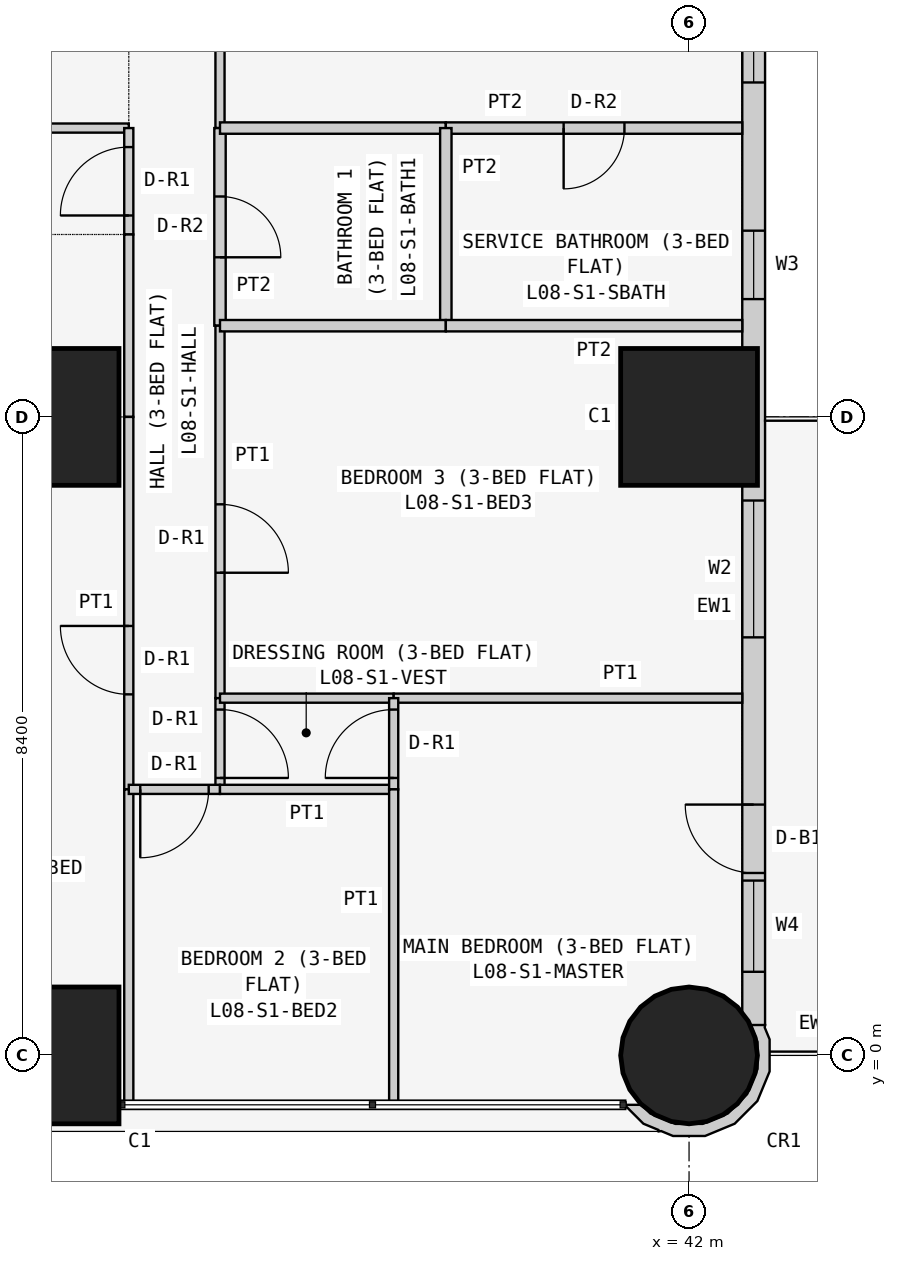
"""IFC4 building model, lengths in metres.
Left out: names, types, materials, properties, quantities, classifications, styles, units other than length and angle.
Written with IfcOpenShell. Run it as: python <this file> out.ifc"""

import sys

from ifc_helpers import new_model, si_unit, direction, frame, frame_2d, origin, origin_2d, place, context, subcontext, project, spatial, polyline, rectangle, circle, outline, extrude, element, fill, save


model = new_model("IFC4")
c1 = context("Model", 3, precision=1e-05, world=origin(), true_north=direction((0.0, 1.0)))
c2 = subcontext(c1, "Body", "Model", "MODEL_VIEW")
j1 = project(units=[si_unit("LENGTHUNIT", "METRE"), si_unit("PLANEANGLEUNIT", "RADIAN")], contexts=[c1])
p1 = place(None, origin())
s1 = spatial("IfcSite", under=j1, at=p1, CompositionType="ELEMENT")
p2 = place(p1, origin())
s2 = spatial("IfcBuilding", under=s1, at=p2, CompositionType="ELEMENT")
p3 = place(p2, frame((0.0, 0.0, 38.1)))
s3 = spatial("IfcBuildingStorey", under=s2, at=p3, CompositionType="ELEMENT", Elevation=38.1)
for number, where, z_axis, x_axis in (
    (1, (33.6, 0.0, 0.0), (0.0, 0.0, 1.0), (1.0, 0.0, 0.0)),
    (2, (33.6, 8.4, 0.0), (0.0, 0.0, 1.0), (1.0, 0.0, 0.0)),
):
    element("IfcColumn", number, at=place(p3, frame(where, z_axis=z_axis, x_axis=x_axis)), inside=s3, PredefinedType="COLUMN", context=c2, shape_type="SweptSolid", body=[
        extrude(rectangle(XDim=1.8, YDim=1.8, at=origin_2d()), origin(), (0.0, 0.0, 1.0), 3.6),
    ])
p4 = place(p3, frame((42.0, 0.0, 0.0), z_axis=(0.0, 0.0, 1.0), x_axis=(1.0, 0.0, 0.0)))
e3 = element("IfcColumn", 3, at=p4, inside=s3, PredefinedType="COLUMN", context=c2, shape_type="SweptSolid", body=[
    extrude(circle(Radius=0.9, at=origin_2d()), origin(), (0.0, 0.0, 1.0), 3.6),
])
p5 = place(p3, frame((42.0, 8.4, 0.0), z_axis=(0.0, 0.0, 1.0), x_axis=(1.0, 0.0, 0.0)))
e4 = element("IfcColumn", 4, at=p5, inside=s3, PredefinedType="COLUMN", context=c2, shape_type="SweptSolid", body=[
    extrude(rectangle(XDim=1.8, YDim=1.8, at=origin_2d()), origin(), (0.0, 0.0, 1.0), 3.6),
])
p6 = place(p3, frame((42.85, 0.4, 0.0), z_axis=(0.0, 0.0, 1.0), x_axis=(0.0, 1.0, 0.0)))
e5 = element("IfcWall", 5, at=p6, inside=s3, PredefinedType="SOLIDWALL", context=c2, shape_type="SweptSolid", body=[
    extrude(rectangle(XDim=15.7, YDim=0.3, at=frame_2d((7.85, 0.0))), origin(), (0.0, 0.0, 1.0), 3.45),
])
p7 = place(p6, frame((12.4, 0.0, 0.9)))
e6 = element("IfcOpeningElement", 6, at=p7, cuts=e5, PredefinedType="OPENING", context=c2, shape_type="SweptSolid", body=[
    extrude(rectangle(XDim=1.8, YDim=1.5, at=frame_2d((0.9, 0.75))), frame((0.0, 0.16, 0.0), z_axis=(0.0, -1.0, 0.0), x_axis=(1.0, 0.0, 0.0)), (0.0, 0.0, 1.0), 0.32),
])
p8 = place(p6, frame((9.55, 0.0, 1.5)))
e7 = element("IfcOpeningElement", 7, at=p8, cuts=e5, PredefinedType="OPENING", context=c2, shape_type="SweptSolid", body=[
    extrude(rectangle(XDim=0.9, YDim=0.7, at=frame_2d((0.45, 0.35))), frame((0.0, 0.16, 0.0), z_axis=(0.0, -1.0, 0.0), x_axis=(1.0, 0.0, 0.0)), (0.0, 0.0, 1.0), 0.32),
])
p9 = place(p6, frame((5.1, 0.0, 0.9)))
e8 = element("IfcOpeningElement", 8, at=p9, cuts=e5, PredefinedType="OPENING", context=c2, shape_type="SweptSolid", body=[
    extrude(rectangle(XDim=1.8, YDim=1.5, at=frame_2d((0.9, 0.75))), frame((0.0, 0.16, 0.0), z_axis=(0.0, -1.0, 0.0), x_axis=(1.0, 0.0, 0.0)), (0.0, 0.0, 1.0), 0.32),
])
p10 = place(p6, frame((2.0, 0.0, 0.0)))
e9 = element("IfcOpeningElement", 9, at=p10, cuts=e5, PredefinedType="OPENING", context=c2, shape_type="SweptSolid", body=[
    extrude(rectangle(XDim=0.9, YDim=2.4, at=frame_2d((0.45, 1.2))), frame((0.0, 0.16, 0.0), z_axis=(0.0, -1.0, 0.0), x_axis=(1.0, 0.0, 0.0)), (0.0, 0.0, 1.0), 0.32),
])
p11 = place(p6, frame((0.7, 0.0, 0.9)))
e10 = element("IfcOpeningElement", 10, at=p11, cuts=e5, PredefinedType="OPENING", context=c2, shape_type="SweptSolid", body=[
    extrude(rectangle(XDim=1.2, YDim=1.5, at=frame_2d((0.6, 0.75))), frame((0.0, 0.16, 0.0), z_axis=(0.0, -1.0, 0.0), x_axis=(1.0, 0.0, 0.0)), (0.0, 0.0, 1.0), 0.32),
])
p12 = place(p3, frame((41.233, -0.611, 0.0), z_axis=(0.0, 0.0, 1.0), x_axis=(0.377204953059, -0.926129809145, 0.0)))
e11 = element("IfcWall", 11, at=p12, inside=s3, PredefinedType="SOLIDWALL", context=c2, shape_type="SweptSolid", body=[
    extrude(outline(polyline([(0.319, 1.843), (-0.072, 2.001), (-0.24, 2.001), (-0.269, 2.017), (-0.37, 1.841), (-0.102, 1.842), (0.23, 1.707), (0.485, 1.455), (0.624, 1.125), (0.626, 0.766), (0.49, 0.434), (0.239, 0.179), (0.09, 0.117), (0.011, -0.078), (0.024, -0.083), (0.33, 0.045), (0.48, 0.197), (0.499, 0.193), (0.508, 0.225), (0.626, 0.345), (0.785, 0.736), (0.782, 1.157), (0.619, 1.546), (0.319, 1.843)])), origin(), (0.0, 0.0, 1.0), 3.45),
])
p13 = place(p3, frame((29.4, 12.2, 0.0), z_axis=(0.0, 0.0, 1.0), x_axis=(1.0, 0.0, 0.0)))
e12 = element("IfcWall", 12, at=p13, inside=s3, PredefinedType="PARTITIONING", context=c2, shape_type="SweptSolid", body=[
    extrude(rectangle(XDim=5.229, YDim=0.12, at=frame_2d((2.615, 0.0))), origin(), (0.0, 0.0, 1.0), 3.45),
])
p14 = place(p3, frame((34.629, 10.8, 0.0), z_axis=(0.0, 0.0, 1.0), x_axis=(0.0, 1.0, 0.0)))
e13 = element("IfcWall", 13, at=p14, inside=s3, PredefinedType="PARTITIONING", context=c2, shape_type="SweptSolid", body=[
    extrude(rectangle(XDim=1.4, YDim=0.12, at=frame_2d((0.7, 0.0))), origin(), (0.0, 0.0, 1.0), 3.45),
])
p15 = place(p14, frame((0.25, 0.0, 0.0)))
e14 = element("IfcOpeningElement", 14, at=p15, cuts=e13, PredefinedType="OPENING", context=c2, shape_type="SweptSolid", body=[
    extrude(rectangle(XDim=0.9, YDim=2.1, at=frame_2d((0.45, 1.05))), frame((0.0, 0.07, 0.0), z_axis=(0.0, -1.0, 0.0), x_axis=(1.0, 0.0, 0.0)), (0.0, 0.0, 1.0), 0.14),
])
p16 = place(p3, frame((34.629, 8.4, 0.0), z_axis=(0.0, 0.0, 1.0), x_axis=(0.0, 1.0, 0.0)))
e15 = element("IfcWall", 15, at=p16, inside=s3, PredefinedType="PARTITIONING", context=c2, shape_type="SweptSolid", body=[
    extrude(rectangle(XDim=2.4, YDim=0.12, at=frame_2d((1.2, 0.0))), origin(), (0.0, 0.0, 1.0), 3.45),
])
p17 = place(p3, frame((34.629, 3.5, 0.0), z_axis=(0.0, 0.0, 1.0), x_axis=(0.0, 1.0, 0.0)))
e16 = element("IfcWall", 16, at=p17, inside=s3, PredefinedType="PARTITIONING", context=c2, shape_type="SweptSolid", body=[
    extrude(rectangle(XDim=4.9, YDim=0.12, at=frame_2d((2.45, 0.0))), origin(), (0.0, 0.0, 1.0), 3.45),
])
p18 = place(p17, frame((1.25, 0.0, 0.0)))
e17 = element("IfcOpeningElement", 17, at=p18, cuts=e16, PredefinedType="OPENING", context=c2, shape_type="SweptSolid", body=[
    extrude(rectangle(XDim=0.9, YDim=2.1, at=frame_2d((0.45, 1.05))), frame((0.0, 0.07, 0.0), z_axis=(0.0, -1.0, 0.0), x_axis=(1.0, 0.0, 0.0)), (0.0, 0.0, 1.0), 0.14),
])
p19 = place(p3, frame((34.629, -0.65, 0.0), z_axis=(0.0, 0.0, 1.0), x_axis=(0.0, 1.0, 0.0)))
e18 = element("IfcWall", 18, at=p19, inside=s3, PredefinedType="PARTITIONING", context=c2, shape_type="SweptSolid", body=[
    extrude(rectangle(XDim=4.15, YDim=0.12, at=frame_2d((2.075, 0.0))), origin(), (0.0, 0.0, 1.0), 3.45),
])
p20 = place(p3, frame((35.829, 12.2, 0.0), z_axis=(0.0, 0.0, 1.0), x_axis=(0.0, 1.0, 0.0)))
e19 = element("IfcWall", 19, at=p20, inside=s3, PredefinedType="PARTITIONING", context=c2, shape_type="SweptSolid", body=[
    extrude(rectangle(XDim=3.575, YDim=0.12, at=frame_2d((1.788, 0.0))), origin(), (0.0, 0.0, 1.0), 3.45),
])
p21 = place(p20, frame((1.35, 0.0, 0.0)))
e20 = element("IfcOpeningElement", 20, at=p21, cuts=e19, PredefinedType="OPENING", context=c2, shape_type="SweptSolid", body=[
    extrude(rectangle(XDim=0.9, YDim=2.1, at=frame_2d((0.45, 1.05))), frame((0.0, 0.07, 0.0), z_axis=(0.0, -1.0, 0.0), x_axis=(1.0, 0.0, 0.0)), (0.0, 0.0, 1.0), 0.14),
])
p22 = place(p3, frame((35.829, 9.6, 0.0), z_axis=(0.0, 0.0, 1.0), x_axis=(0.0, 1.0, 0.0)))
e21 = element("IfcWall", 21, at=p22, inside=s3, PredefinedType="PARTITIONING", context=c2, shape_type="SweptSolid", body=[
    extrude(rectangle(XDim=2.6, YDim=0.15, at=frame_2d((1.3, 0.0))), origin(), (0.0, 0.0, 1.0), 3.45),
])
p23 = place(p22, frame((0.9, 0.0, 0.0)))
e22 = element("IfcOpeningElement", 22, at=p23, cuts=e21, PredefinedType="OPENING", context=c2, shape_type="SweptSolid", body=[
    extrude(rectangle(XDim=0.8, YDim=2.1, at=frame_2d((0.4, 1.05))), frame((0.0, 0.085, 0.0), z_axis=(0.0, -1.0, 0.0), x_axis=(1.0, 0.0, 0.0)), (0.0, 0.0, 1.0), 0.17),
])
p24 = place(p3, frame((35.829, 4.7, 0.0), z_axis=(0.0, 0.0, 1.0), x_axis=(0.0, 1.0, 0.0)))
e23 = element("IfcWall", 23, at=p24, inside=s3, PredefinedType="PARTITIONING", context=c2, shape_type="SweptSolid", body=[
    extrude(rectangle(XDim=4.9, YDim=0.12, at=frame_2d((2.45, 0.0))), origin(), (0.0, 0.0, 1.0), 3.45),
])
p25 = place(p24, frame((1.65, 0.0, 0.0)))
e24 = element("IfcOpeningElement", 24, at=p25, cuts=e23, PredefinedType="OPENING", context=c2, shape_type="SweptSolid", body=[
    extrude(rectangle(XDim=0.9, YDim=2.1, at=frame_2d((0.45, 1.05))), frame((0.0, 0.07, 0.0), z_axis=(0.0, -1.0, 0.0), x_axis=(1.0, 0.0, 0.0)), (0.0, 0.0, 1.0), 0.14),
])
p26 = place(p3, frame((35.829, 3.5, 0.0), z_axis=(0.0, 0.0, 1.0), x_axis=(0.0, 1.0, 0.0)))
e25 = element("IfcWall", 25, at=p26, inside=s3, PredefinedType="PARTITIONING", context=c2, shape_type="SweptSolid", body=[
    extrude(rectangle(XDim=1.2, YDim=0.12, at=frame_2d((0.6, 0.0))), origin(), (0.0, 0.0, 1.0), 3.45),
])
p27 = place(p26, frame((0.15, 0.0, 0.0)))
e26 = element("IfcOpeningElement", 26, at=p27, cuts=e25, PredefinedType="OPENING", context=c2, shape_type="SweptSolid", body=[
    extrude(rectangle(XDim=0.9, YDim=2.1, at=frame_2d((0.45, 1.05))), frame((0.0, 0.07, 0.0), z_axis=(0.0, -1.0, 0.0), x_axis=(1.0, 0.0, 0.0)), (0.0, 0.0, 1.0), 0.14),
])
p28 = place(p3, frame((34.629, 3.5, 0.0), z_axis=(0.0, 0.0, 1.0), x_axis=(1.0, 0.0, 0.0)))
e27 = element("IfcWall", 27, at=p28, inside=s3, PredefinedType="PARTITIONING", context=c2, shape_type="SweptSolid", body=[
    extrude(rectangle(XDim=1.2, YDim=0.12, at=frame_2d((0.6, 0.0))), origin(), (0.0, 0.0, 1.0), 3.45),
])
p29 = place(p28, frame((0.151, 0.0, 0.0)))
e28 = element("IfcOpeningElement", 28, at=p29, cuts=e27, PredefinedType="OPENING", context=c2, shape_type="SweptSolid", body=[
    extrude(rectangle(XDim=0.9, YDim=2.1, at=frame_2d((0.45, 1.05))), frame((0.0, 0.07, 0.0), z_axis=(0.0, -1.0, 0.0), x_axis=(1.0, 0.0, 0.0)), (0.0, 0.0, 1.0), 0.14),
])
p30 = place(p3, frame((35.829, 12.2, 0.0), z_axis=(0.0, 0.0, 1.0), x_axis=(1.0, 0.0, 0.0)))
e29 = element("IfcWall", 29, at=p30, inside=s3, PredefinedType="PARTITIONING", context=c2, shape_type="SweptSolid", body=[
    extrude(rectangle(XDim=2.971, YDim=0.15, at=frame_2d((1.485, 0.0))), origin(), (0.0, 0.0, 1.0), 3.45),
])
p31 = place(p3, frame((38.8, 12.2, 0.0), z_axis=(0.0, 0.0, 1.0), x_axis=(1.0, 0.0, 0.0)))
e30 = element("IfcWall", 30, at=p31, inside=s3, PredefinedType="PARTITIONING", context=c2, shape_type="SweptSolid", body=[
    extrude(rectangle(XDim=3.9, YDim=0.15, at=frame_2d((1.95, 0.0))), origin(), (0.0, 0.0, 1.0), 3.45),
])
p32 = place(p31, frame((1.55, 0.0, 0.0)))
e31 = element("IfcOpeningElement", 31, at=p32, cuts=e30, PredefinedType="OPENING", context=c2, shape_type="SweptSolid", body=[
    extrude(rectangle(XDim=0.8, YDim=2.1, at=frame_2d((0.4, 1.05))), frame((0.0, 0.085, 0.0), z_axis=(0.0, -1.0, 0.0), x_axis=(1.0, 0.0, 0.0)), (0.0, 0.0, 1.0), 0.17),
])
p33 = place(p3, frame((38.8, 9.6, 0.0), z_axis=(0.0, 0.0, 1.0), x_axis=(0.0, 1.0, 0.0)))
e32 = element("IfcWall", 32, at=p33, inside=s3, PredefinedType="PARTITIONING", context=c2, shape_type="SweptSolid", body=[
    extrude(rectangle(XDim=2.6, YDim=0.15, at=frame_2d((1.3, 0.0))), origin(), (0.0, 0.0, 1.0), 3.45),
])
p34 = place(p3, frame((35.829, 9.6, 0.0), z_axis=(0.0, 0.0, 1.0), x_axis=(1.0, 0.0, 0.0)))
e33 = element("IfcWall", 33, at=p34, inside=s3, PredefinedType="PARTITIONING", context=c2, shape_type="SweptSolid", body=[
    extrude(rectangle(XDim=2.971, YDim=0.15, at=frame_2d((1.485, 0.0))), origin(), (0.0, 0.0, 1.0), 3.45),
])
p35 = place(p3, frame((38.8, 9.6, 0.0), z_axis=(0.0, 0.0, 1.0), x_axis=(1.0, 0.0, 0.0)))
e34 = element("IfcWall", 34, at=p35, inside=s3, PredefinedType="PARTITIONING", context=c2, shape_type="SweptSolid", body=[
    extrude(rectangle(XDim=3.9, YDim=0.15, at=frame_2d((1.95, 0.0))), origin(), (0.0, 0.0, 1.0), 3.45),
])
p36 = place(p3, frame((35.829, 4.7, 0.0), z_axis=(0.0, 0.0, 1.0), x_axis=(1.0, 0.0, 0.0)))
e35 = element("IfcWall", 35, at=p36, inside=s3, PredefinedType="PARTITIONING", context=c2, shape_type="SweptSolid", body=[
    extrude(rectangle(XDim=2.285, YDim=0.12, at=frame_2d((1.143, 0.0))), origin(), (0.0, 0.0, 1.0), 3.45),
])
p37 = place(p3, frame((38.114, 4.7, 0.0), z_axis=(0.0, 0.0, 1.0), x_axis=(1.0, 0.0, 0.0)))
e36 = element("IfcWall", 36, at=p37, inside=s3, PredefinedType="PARTITIONING", context=c2, shape_type="SweptSolid", body=[
    extrude(rectangle(XDim=4.586, YDim=0.12, at=frame_2d((2.293, 0.0))), origin(), (0.0, 0.0, 1.0), 3.45),
])
p38 = place(p3, frame((35.829, 3.5, 0.0), z_axis=(0.0, 0.0, 1.0), x_axis=(1.0, 0.0, 0.0)))
e37 = element("IfcWall", 37, at=p38, inside=s3, PredefinedType="PARTITIONING", context=c2, shape_type="SweptSolid", body=[
    extrude(rectangle(XDim=2.285, YDim=0.12, at=frame_2d((1.143, 0.0))), origin(), (0.0, 0.0, 1.0), 3.45),
])
p39 = place(p3, frame((38.114, 3.5, 0.0), z_axis=(0.0, 0.0, 1.0), x_axis=(0.0, 1.0, 0.0)))
e38 = element("IfcWall", 38, at=p39, inside=s3, PredefinedType="PARTITIONING", context=c2, shape_type="SweptSolid", body=[
    extrude(rectangle(XDim=1.2, YDim=0.12, at=frame_2d((0.6, 0.0))), origin(), (0.0, 0.0, 1.0), 3.45),
])
p40 = place(p39, frame((0.15, 0.0, 0.0)))
e39 = element("IfcOpeningElement", 39, at=p40, cuts=e38, PredefinedType="OPENING", context=c2, shape_type="SweptSolid", body=[
    extrude(rectangle(XDim=0.9, YDim=2.1, at=frame_2d((0.45, 1.05))), frame((0.0, 0.07, 0.0), z_axis=(0.0, -1.0, 0.0), x_axis=(1.0, 0.0, 0.0)), (0.0, 0.0, 1.0), 0.14),
])
p41 = place(p3, frame((38.114, -0.65, 0.0), z_axis=(0.0, 0.0, 1.0), x_axis=(0.0, 1.0, 0.0)))
e40 = element("IfcWall", 40, at=p41, inside=s3, PredefinedType="PARTITIONING", context=c2, shape_type="SweptSolid", body=[
    extrude(rectangle(XDim=4.15, YDim=0.12, at=frame_2d((2.075, 0.0))), origin(), (0.0, 0.0, 1.0), 3.45),
])
p42 = place(p7, origin())
e41 = element("IfcWindow", 41, at=p42, inside=s3, PartitioningType="SINGLE_PANEL", PredefinedType="WINDOW", context=c2, shape_type="SweptSolid", body=[
    extrude(rectangle(XDim=1.8, YDim=1.5, at=frame_2d((0.9, 0.75))), frame((0.0, 0.03, 0.0), z_axis=(0.0, -1.0, 0.0), x_axis=(1.0, 0.0, 0.0)), (0.0, 0.0, 1.0), 0.06),
])
fill(e6, e41)
p43 = place(p8, origin())
e42 = element("IfcWindow", 42, at=p43, inside=s3, PartitioningType="SINGLE_PANEL", PredefinedType="WINDOW", context=c2, shape_type="SweptSolid", body=[
    extrude(rectangle(XDim=0.9, YDim=0.7, at=frame_2d((0.45, 0.35))), frame((0.0, 0.03, 0.0), z_axis=(0.0, -1.0, 0.0), x_axis=(1.0, 0.0, 0.0)), (0.0, 0.0, 1.0), 0.06),
])
fill(e7, e42)
p44 = place(p9, origin())
e43 = element("IfcWindow", 43, at=p44, inside=s3, PartitioningType="SINGLE_PANEL", PredefinedType="WINDOW", context=c2, shape_type="SweptSolid", body=[
    extrude(rectangle(XDim=1.8, YDim=1.5, at=frame_2d((0.9, 0.75))), frame((0.0, 0.03, 0.0), z_axis=(0.0, -1.0, 0.0), x_axis=(1.0, 0.0, 0.0)), (0.0, 0.0, 1.0), 0.06),
])
fill(e8, e43)
p45 = place(p10, origin())
e44 = element("IfcDoor", 44, at=p45, inside=s3, OperationType="SINGLE_SWING_RIGHT", PredefinedType="DOOR", context=c2, shape_type="SweptSolid", body=[
    extrude(rectangle(XDim=0.9, YDim=2.4, at=frame_2d((0.45, 1.2))), frame((0.0, 0.025, 0.0), z_axis=(0.0, -1.0, 0.0), x_axis=(1.0, 0.0, 0.0)), (0.0, 0.0, 1.0), 0.05),
])
fill(e9, e44)
p46 = place(p11, origin())
e45 = element("IfcWindow", 45, at=p46, inside=s3, PartitioningType="SINGLE_PANEL", PredefinedType="WINDOW", context=c2, shape_type="SweptSolid", body=[
    extrude(rectangle(XDim=1.2, YDim=1.5, at=frame_2d((0.6, 0.75))), frame((0.0, 0.03, 0.0), z_axis=(0.0, -1.0, 0.0), x_axis=(1.0, 0.0, 0.0)), (0.0, 0.0, 1.0), 0.06),
])
fill(e10, e45)
p47 = place(p15, origin())
e46 = element("IfcDoor", 46, at=p47, inside=s3, OperationType="SINGLE_SWING_LEFT", PredefinedType="DOOR", context=c2, shape_type="SweptSolid", body=[
    extrude(rectangle(XDim=0.9, YDim=2.1, at=frame_2d((0.45, 1.05))), frame((0.0, 0.025, 0.0), z_axis=(0.0, -1.0, 0.0), x_axis=(1.0, 0.0, 0.0)), (0.0, 0.0, 1.0), 0.05),
])
fill(e14, e46)
p48 = place(p18, origin())
e47 = element("IfcDoor", 47, at=p48, inside=s3, OperationType="SINGLE_SWING_RIGHT", PredefinedType="DOOR", context=c2, shape_type="SweptSolid", body=[
    extrude(rectangle(XDim=0.9, YDim=2.1, at=frame_2d((0.45, 1.05))), frame((0.0, 0.025, 0.0), z_axis=(0.0, -1.0, 0.0), x_axis=(1.0, 0.0, 0.0)), (0.0, 0.0, 1.0), 0.05),
])
fill(e17, e47)
p49 = place(p32, frame((0.8, 0.0, 0.0), z_axis=(0.0, 0.0, 1.0), x_axis=(-1.0, 0.0, 0.0)))
e48 = element("IfcDoor", 48, at=p49, inside=s3, OperationType="SINGLE_SWING_RIGHT", PredefinedType="DOOR", context=c2, shape_type="SweptSolid", body=[
    extrude(rectangle(XDim=0.8, YDim=2.1, at=frame_2d((0.4, 1.05))), frame((0.0, 0.025, 0.0), z_axis=(0.0, -1.0, 0.0), x_axis=(1.0, 0.0, 0.0)), (0.0, 0.0, 1.0), 0.05),
])
fill(e31, e48)
p50 = place(p23, frame((0.8, 0.0, 0.0), z_axis=(0.0, 0.0, 1.0), x_axis=(-1.0, 0.0, 0.0)))
e49 = element("IfcDoor", 49, at=p50, inside=s3, OperationType="SINGLE_SWING_RIGHT", PredefinedType="DOOR", context=c2, shape_type="SweptSolid", body=[
    extrude(rectangle(XDim=0.8, YDim=2.1, at=frame_2d((0.4, 1.05))), frame((0.0, 0.025, 0.0), z_axis=(0.0, -1.0, 0.0), x_axis=(1.0, 0.0, 0.0)), (0.0, 0.0, 1.0), 0.05),
])
fill(e22, e49)
p51 = place(p25, frame((0.9, 0.0, 0.0), z_axis=(0.0, 0.0, 1.0), x_axis=(-1.0, 0.0, 0.0)))
e50 = element("IfcDoor", 50, at=p51, inside=s3, OperationType="SINGLE_SWING_RIGHT", PredefinedType="DOOR", context=c2, shape_type="SweptSolid", body=[
    extrude(rectangle(XDim=0.9, YDim=2.1, at=frame_2d((0.45, 1.05))), frame((0.0, 0.025, 0.0), z_axis=(0.0, -1.0, 0.0), x_axis=(1.0, 0.0, 0.0)), (0.0, 0.0, 1.0), 0.05),
])
fill(e24, e50)
p52 = place(p27, frame((0.9, 0.0, 0.0), z_axis=(0.0, 0.0, 1.0), x_axis=(-1.0, 0.0, 0.0)))
e51 = element("IfcDoor", 51, at=p52, inside=s3, OperationType="SINGLE_SWING_RIGHT", PredefinedType="DOOR", context=c2, shape_type="SweptSolid", body=[
    extrude(rectangle(XDim=0.9, YDim=2.1, at=frame_2d((0.45, 1.05))), frame((0.0, 0.025, 0.0), z_axis=(0.0, -1.0, 0.0), x_axis=(1.0, 0.0, 0.0)), (0.0, 0.0, 1.0), 0.05),
])
fill(e26, e51)
p53 = place(p40, origin())
e52 = element("IfcDoor", 52, at=p53, inside=s3, OperationType="SINGLE_SWING_LEFT", PredefinedType="DOOR", context=c2, shape_type="SweptSolid", body=[
    extrude(rectangle(XDim=0.9, YDim=2.1, at=frame_2d((0.45, 1.05))), frame((0.0, 0.025, 0.0), z_axis=(0.0, -1.0, 0.0), x_axis=(1.0, 0.0, 0.0)), (0.0, 0.0, 1.0), 0.05),
])
fill(e39, e52)
p54 = place(p29, frame((0.9, 0.0, 0.0), z_axis=(0.0, 0.0, 1.0), x_axis=(-1.0, 0.0, 0.0)))
e53 = element("IfcDoor", 53, at=p54, inside=s3, OperationType="SINGLE_SWING_RIGHT", PredefinedType="DOOR", context=c2, shape_type="SweptSolid", body=[
    extrude(rectangle(XDim=0.9, YDim=2.1, at=frame_2d((0.45, 1.05))), frame((0.0, 0.025, 0.0), z_axis=(0.0, -1.0, 0.0), x_axis=(1.0, 0.0, 0.0)), (0.0, 0.0, 1.0), 0.05),
])
fill(e28, e53)
save(model, sys.argv[1])
